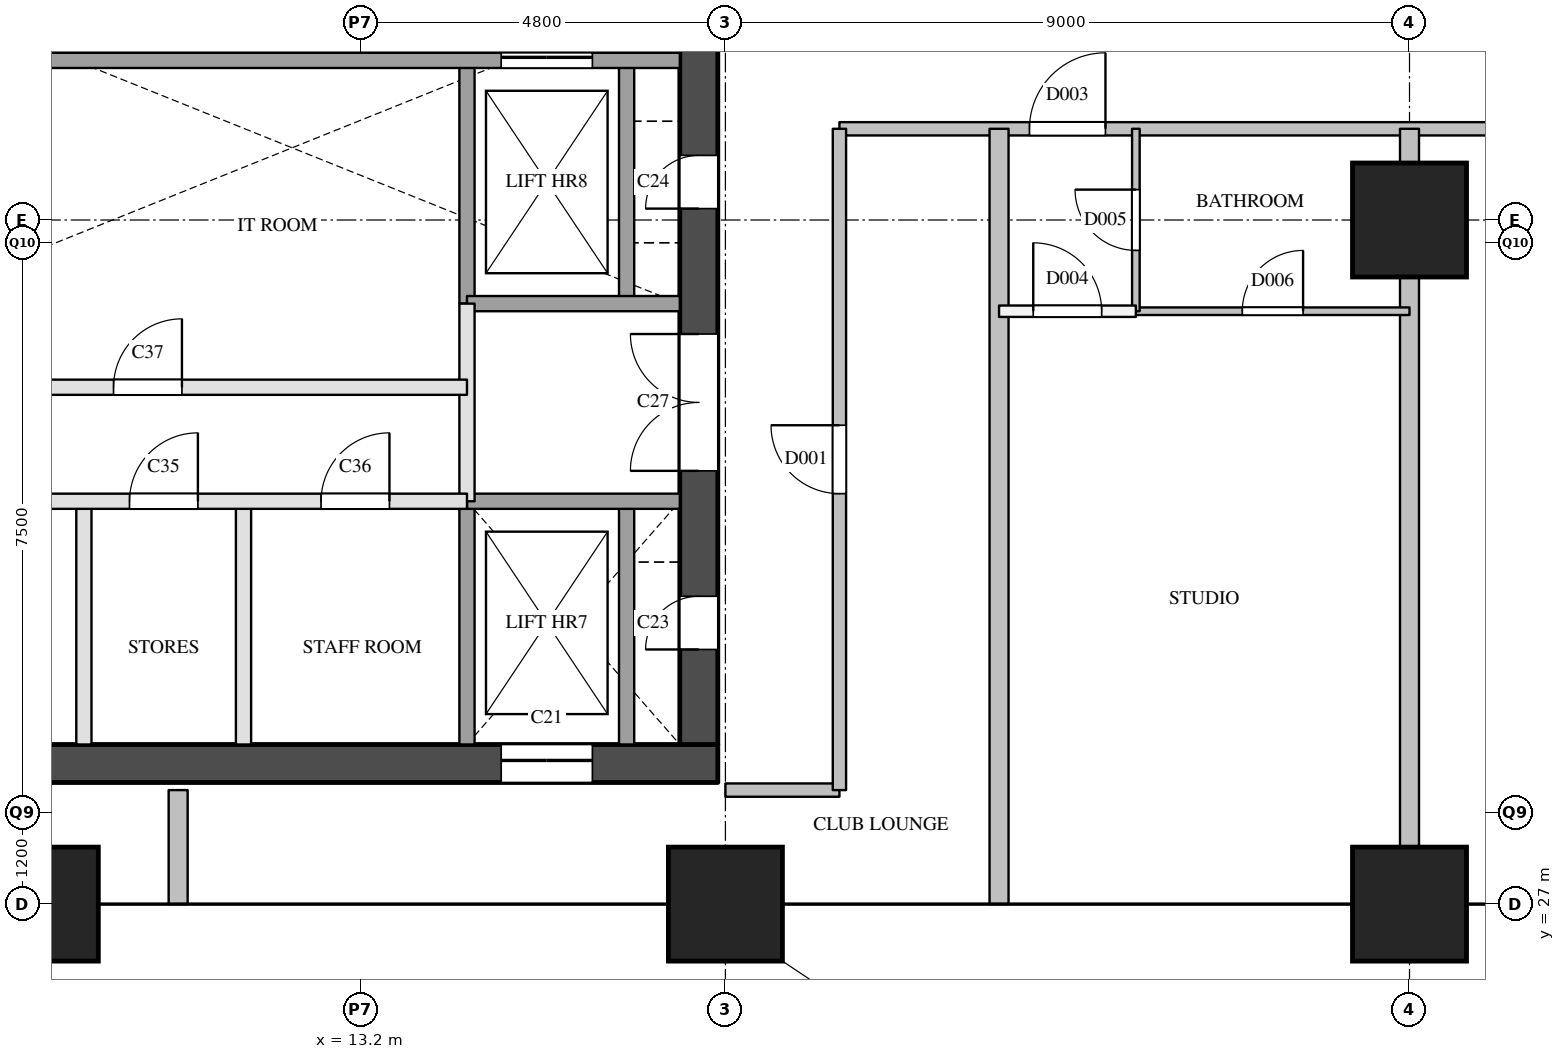
"""IFC4 building model, lengths in metres.
Left out: names, types, materials, properties, quantities, classifications, styles, units other than length and angle.
Written with IfcOpenShell. Run it as: python <this file> out.ifc"""

import sys

from ifc_helpers import new_model, si_unit, direction, frame, frame_2d, origin, origin_2d, place, context, subcontext, project, spatial, rectangle, extrude, element, fill, save


model = new_model("IFC4")
c1 = context("Model", 3, precision=1e-05, world=origin(), true_north=direction((0.0, 1.0)))
c2 = subcontext(c1, "Body", "Model", "MODEL_VIEW")
j1 = project(units=[si_unit("LENGTHUNIT", "METRE"), si_unit("PLANEANGLEUNIT", "RADIAN")], contexts=[c1])
p1 = place(None, origin())
s1 = spatial("IfcSite", under=j1, at=p1, CompositionType="ELEMENT")
p2 = place(p1, origin())
s2 = spatial("IfcBuilding", under=s1, at=p2, CompositionType="ELEMENT")
p3 = place(p2, frame((0.0, 0.0, 162.2)))
s3 = spatial("IfcBuildingStorey", under=s2, at=p3, CompositionType="ELEMENT", Elevation=162.2)
for number, where, z_axis, x_axis in (
    (1, (9.0, 27.0, 0.0), (0.0, 0.0, 1.0), (1.0, 0.0, 0.0)),
    (2, (18.0, 27.0, 0.0), (0.0, 0.0, 1.0), (1.0, 0.0, 0.0)),
    (3, (27.0, 27.0, 0.0), (0.0, 0.0, 1.0), (1.0, 0.0, 0.0)),
    (4, (27.0, 36.0, 0.0), (0.0, 0.0, 1.0), (1.0, 0.0, 0.0)),
):
    element("IfcColumn", number, at=place(p3, frame(where, z_axis=z_axis, x_axis=x_axis)), inside=s3, PredefinedType="COLUMN", context=c2, shape_type="SweptSolid", body=[
        extrude(rectangle(XDim=1.5, YDim=1.5, at=origin_2d()), origin(), (0.0, 0.0, 1.0), 3.9),
    ])
p4 = place(p3, frame((5.7, 28.85, 0.0), z_axis=(0.0, 0.0, 1.0), x_axis=(1.0, 0.0, 0.0)))
e5 = element("IfcWall", 5, at=p4, inside=s3, PredefinedType="SHEAR", context=c2, shape_type="SweptSolid", body=[
    extrude(rectangle(XDim=12.2, YDim=0.5, at=frame_2d((6.1, 0.0))), origin(), (0.0, 0.0, 1.0), 3.6),
])
p5 = place(p4, frame((9.35, 0.0, 0.0)))
e6 = element("IfcOpeningElement", 6, at=p5, cuts=e5, PredefinedType="OPENING", context=c2, shape_type="SweptSolid", body=[
    extrude(rectangle(XDim=1.2, YDim=2.1, at=frame_2d((0.6, 1.05))), frame((0.0, 0.26, 0.0), z_axis=(0.0, -1.0, 0.0), x_axis=(1.0, 0.0, 0.0)), (0.0, 0.0, 1.0), 0.52),
])
p6 = place(p3, frame((17.65, 29.1, 0.0), z_axis=(0.0, 0.0, 1.0), x_axis=(0.0, 1.0, 0.0)))
e7 = element("IfcWall", 7, at=p6, inside=s3, PredefinedType="SHEAR", context=c2, shape_type="SweptSolid", body=[
    extrude(rectangle(XDim=20.3, YDim=0.5, at=frame_2d((10.15, 0.0))), origin(), (0.0, 0.0, 1.0), 3.6),
])
p7 = place(p6, frame((1.25, 0.0, 0.0)))
e8 = element("IfcOpeningElement", 8, at=p7, cuts=e7, PredefinedType="OPENING", context=c2, shape_type="SweptSolid", body=[
    extrude(rectangle(XDim=0.7, YDim=2.1, at=frame_2d((0.35, 1.05))), frame((0.0, 0.26, 0.0), z_axis=(0.0, -1.0, 0.0), x_axis=(1.0, 0.0, 0.0)), (0.0, 0.0, 1.0), 0.52),
])
p8 = place(p6, frame((7.05, 0.0, 0.0)))
e9 = element("IfcOpeningElement", 9, at=p8, cuts=e7, PredefinedType="OPENING", context=c2, shape_type="SweptSolid", body=[
    extrude(rectangle(XDim=0.7, YDim=2.1, at=frame_2d((0.35, 1.05))), frame((0.0, 0.26, 0.0), z_axis=(0.0, -1.0, 0.0), x_axis=(1.0, 0.0, 0.0)), (0.0, 0.0, 1.0), 0.52),
])
p9 = place(p6, frame((3.6, 0.0, 0.0)))
e10 = element("IfcOpeningElement", 10, at=p9, cuts=e7, PredefinedType="OPENING", context=c2, shape_type="SweptSolid", body=[
    extrude(rectangle(XDim=1.8, YDim=2.1, at=frame_2d((0.9, 1.05))), frame((0.0, 0.26, 0.0), z_axis=(0.0, -1.0, 0.0), x_axis=(1.0, 0.0, 0.0)), (0.0, 0.0, 1.0), 0.52),
])
for number, where, z_axis, x_axis in (
    (11, (9.56, 29.1, 0.0), (0.0, 0.0, 1.0), (0.0, 1.0, 0.0)),
    (12, (11.66, 29.1, 0.0), (0.0, 0.0, 1.0), (0.0, 1.0, 0.0)),
):
    element("IfcWall", number, at=place(p3, frame(where, z_axis=z_axis, x_axis=x_axis)), inside=s3, PredefinedType="PARTITIONING", context=c2, shape_type="SweptSolid", body=[
        extrude(rectangle(XDim=3.2, YDim=0.2, at=frame_2d((1.6, 0.0))), origin(), (0.0, 0.0, 1.0), 3.6),
    ])
p10 = place(p3, frame((14.6, 32.3, 0.0), z_axis=(0.0, 0.0, 1.0), x_axis=(0.0, 1.0, 0.0)))
e13 = element("IfcWall", 13, at=p10, inside=s3, PredefinedType="PARTITIONING", context=c2, shape_type="SweptSolid", body=[
    extrude(rectangle(XDim=2.6, YDim=0.2, at=frame_2d((1.3, 0.0))), origin(), (0.0, 0.0, 1.0), 3.6),
])
p11 = place(p3, frame((14.6, 29.1, 0.0), z_axis=(0.0, 0.0, 1.0), x_axis=(0.0, 1.0, 0.0)))
e14 = element("IfcWall", 14, at=p11, inside=s3, PredefinedType="SOLIDWALL", context=c2, shape_type="SweptSolid", body=[
    extrude(rectangle(XDim=3.2, YDim=0.2, at=frame_2d((1.6, 0.0))), origin(), (0.0, 0.0, 1.0), 3.6),
])
p12 = place(p3, frame((14.6, 34.9, 0.0), z_axis=(0.0, 0.0, 1.0), x_axis=(0.0, 1.0, 0.0)))
e15 = element("IfcWall", 15, at=p12, inside=s3, PredefinedType="SOLIDWALL", context=c2, shape_type="SweptSolid", body=[
    extrude(rectangle(XDim=3.2, YDim=0.2, at=frame_2d((1.6, 0.0))), origin(), (0.0, 0.0, 1.0), 3.6),
])
p13 = place(p3, frame((16.7, 29.1, 0.0), z_axis=(0.0, 0.0, 1.0), x_axis=(0.0, 1.0, 0.0)))
e16 = element("IfcWall", 16, at=p13, inside=s3, PredefinedType="SOLIDWALL", context=c2, shape_type="SweptSolid", body=[
    extrude(rectangle(XDim=3.2, YDim=0.2, at=frame_2d((1.6, 0.0))), origin(), (0.0, 0.0, 1.0), 3.6),
])
p14 = place(p3, frame((16.7, 34.9, 0.0), z_axis=(0.0, 0.0, 1.0), x_axis=(0.0, 1.0, 0.0)))
e17 = element("IfcWall", 17, at=p14, inside=s3, PredefinedType="SOLIDWALL", context=c2, shape_type="SweptSolid", body=[
    extrude(rectangle(XDim=3.2, YDim=0.2, at=frame_2d((1.6, 0.0))), origin(), (0.0, 0.0, 1.0), 3.6),
])
p15 = place(p3, frame((6.2, 32.3, 0.0), z_axis=(0.0, 0.0, 1.0), x_axis=(1.0, 0.0, 0.0)))
e18 = element("IfcWall", 18, at=p15, inside=s3, PredefinedType="PARTITIONING", context=c2, shape_type="SweptSolid", body=[
    extrude(rectangle(XDim=8.4, YDim=0.2, at=frame_2d((4.2, 0.0))), origin(), (0.0, 0.0, 1.0), 3.6),
])
p16 = place(p15, frame((1.23, 0.0, 0.0)))
e19 = element("IfcOpeningElement", 19, at=p16, cuts=e18, PredefinedType="OPENING", context=c2, shape_type="SweptSolid", body=[
    extrude(rectangle(XDim=0.9, YDim=2.1, at=frame_2d((0.45, 1.05))), frame((0.0, 0.11, 0.0), z_axis=(0.0, -1.0, 0.0), x_axis=(1.0, 0.0, 0.0)), (0.0, 0.0, 1.0), 0.22),
])
p17 = place(p15, frame((3.96, 0.0, 0.0)))
e20 = element("IfcOpeningElement", 20, at=p17, cuts=e18, PredefinedType="OPENING", context=c2, shape_type="SweptSolid", body=[
    extrude(rectangle(XDim=0.9, YDim=2.1, at=frame_2d((0.45, 1.05))), frame((0.0, 0.11, 0.0), z_axis=(0.0, -1.0, 0.0), x_axis=(1.0, 0.0, 0.0)), (0.0, 0.0, 1.0), 0.22),
])
p18 = place(p15, frame((6.48, 0.0, 0.0)))
e21 = element("IfcOpeningElement", 21, at=p18, cuts=e18, PredefinedType="OPENING", context=c2, shape_type="SweptSolid", body=[
    extrude(rectangle(XDim=0.9, YDim=2.1, at=frame_2d((0.45, 1.05))), frame((0.0, 0.11, 0.0), z_axis=(0.0, -1.0, 0.0), x_axis=(1.0, 0.0, 0.0)), (0.0, 0.0, 1.0), 0.22),
])
p19 = place(p3, frame((14.6, 32.3, 0.0), z_axis=(0.0, 0.0, 1.0), x_axis=(1.0, 0.0, 0.0)))
e22 = element("IfcWall", 22, at=p19, inside=s3, PredefinedType="SOLIDWALL", context=c2, shape_type="SweptSolid", body=[
    extrude(rectangle(XDim=2.8, YDim=0.2, at=frame_2d((1.4, 0.0))), origin(), (0.0, 0.0, 1.0), 3.6),
])
p20 = place(p3, frame((6.2, 33.8, 0.0), z_axis=(0.0, 0.0, 1.0), x_axis=(1.0, 0.0, 0.0)))
e23 = element("IfcWall", 23, at=p20, inside=s3, PredefinedType="PARTITIONING", context=c2, shape_type="SweptSolid", body=[
    extrude(rectangle(XDim=8.4, YDim=0.2, at=frame_2d((4.2, 0.0))), origin(), (0.0, 0.0, 1.0), 3.6),
])
p21 = place(p20, frame((3.75, 0.0, 0.0)))
e24 = element("IfcOpeningElement", 24, at=p21, cuts=e23, PredefinedType="OPENING", context=c2, shape_type="SweptSolid", body=[
    extrude(rectangle(XDim=0.9, YDim=2.1, at=frame_2d((0.45, 1.05))), frame((0.0, 0.11, 0.0), z_axis=(0.0, -1.0, 0.0), x_axis=(1.0, 0.0, 0.0)), (0.0, 0.0, 1.0), 0.22),
])
p22 = place(p3, frame((14.6, 34.9, 0.0), z_axis=(0.0, 0.0, 1.0), x_axis=(1.0, 0.0, 0.0)))
e25 = element("IfcWall", 25, at=p22, inside=s3, PredefinedType="SOLIDWALL", context=c2, shape_type="SweptSolid", body=[
    extrude(rectangle(XDim=2.8, YDim=0.2, at=frame_2d((1.4, 0.0))), origin(), (0.0, 0.0, 1.0), 3.6),
])
p23 = place(p3, frame((6.2, 38.1, 0.0), z_axis=(0.0, 0.0, 1.0), x_axis=(1.0, 0.0, 0.0)))
e26 = element("IfcWall", 26, at=p23, inside=s3, PredefinedType="SOLIDWALL", context=c2, shape_type="SweptSolid", body=[
    extrude(rectangle(XDim=11.2, YDim=0.2, at=frame_2d((5.6, 0.0))), origin(), (0.0, 0.0, 1.0), 3.6),
])
p24 = place(p23, frame((8.85, 0.0, 0.0)))
e27 = element("IfcOpeningElement", 27, at=p24, cuts=e26, PredefinedType="OPENING", context=c2, shape_type="SweptSolid", body=[
    extrude(rectangle(XDim=1.2, YDim=2.1, at=frame_2d((0.6, 1.05))), frame((0.0, 0.11, 0.0), z_axis=(0.0, -1.0, 0.0), x_axis=(1.0, 0.0, 0.0)), (0.0, 0.0, 1.0), 0.22),
])
p25 = place(p3, frame((18.0, 28.5, 0.0), z_axis=(0.0, 0.0, 1.0), x_axis=(1.0, 0.0, 0.0)))
e28 = element("IfcWall", 28, at=p25, inside=s3, PredefinedType="PARTITIONING", context=c2, shape_type="SweptSolid", body=[
    extrude(rectangle(XDim=1.5, YDim=0.175, at=frame_2d((0.75, 0.0))), origin(), (0.0, 0.0, 1.0), 3.6),
])
p26 = place(p3, frame((19.5, 37.2, 0.0), z_axis=(0.0, 0.0, 1.0), x_axis=(1.0, 0.0, 0.0)))
e29 = element("IfcWall", 29, at=p26, inside=s3, PredefinedType="PARTITIONING", context=c2, shape_type="SweptSolid", body=[
    extrude(rectangle(XDim=15.0, YDim=0.175, at=frame_2d((7.5, 0.0))), origin(), (0.0, 0.0, 1.0), 2.6),
])
p27 = place(p26, frame((2.5, 0.0, 0.0)))
e30 = element("IfcOpeningElement", 30, at=p27, cuts=e29, PredefinedType="OPENING", context=c2, shape_type="SweptSolid", body=[
    extrude(rectangle(XDim=1.0, YDim=2.1, at=frame_2d((0.5, 1.05))), frame((0.0, 0.097, 0.0), z_axis=(0.0, -1.0, 0.0), x_axis=(1.0, 0.0, 0.0)), (0.0, 0.0, 1.0), 0.195),
])
p28 = place(p3, frame((19.5, 28.5, 0.0), z_axis=(0.0, 0.0, 1.0), x_axis=(0.0, 1.0, 0.0)))
e31 = element("IfcWall", 31, at=p28, inside=s3, PredefinedType="PARTITIONING", context=c2, shape_type="SweptSolid", body=[
    extrude(rectangle(XDim=8.7, YDim=0.175, at=frame_2d((4.35, 0.0))), origin(), (0.0, 0.0, 1.0), 3.6),
])
p29 = place(p28, frame((3.9, 0.0, 0.0)))
e32 = element("IfcOpeningElement", 32, at=p29, cuts=e31, PredefinedType="OPENING", context=c2, shape_type="SweptSolid", body=[
    extrude(rectangle(XDim=0.9, YDim=2.1, at=frame_2d((0.45, 1.05))), frame((0.0, 0.097, 0.0), z_axis=(0.0, -1.0, 0.0), x_axis=(1.0, 0.0, 0.0)), (0.0, 0.0, 1.0), 0.195),
])
p30 = place(p3, frame((21.6, 34.8, 0.0), z_axis=(0.0, 0.0, 1.0), x_axis=(1.0, 0.0, 0.0)))
e33 = element("IfcWall", 33, at=p30, inside=s3, PredefinedType="PARTITIONING", context=c2, shape_type="SweptSolid", body=[
    extrude(rectangle(XDim=1.8, YDim=0.15, at=frame_2d((0.9, 0.0))), origin(), (0.0, 0.0, 1.0), 3.6),
])
p31 = place(p30, frame((0.45, 0.0, 0.0)))
e34 = element("IfcOpeningElement", 34, at=p31, cuts=e33, PredefinedType="OPENING", context=c2, shape_type="SweptSolid", body=[
    extrude(rectangle(XDim=0.9, YDim=2.1, at=frame_2d((0.45, 1.05))), frame((0.0, 0.085, 0.0), z_axis=(0.0, -1.0, 0.0), x_axis=(1.0, 0.0, 0.0)), (0.0, 0.0, 1.0), 0.17),
])
p32 = place(p3, frame((10.8, 27.0, 0.0), z_axis=(0.0, 0.0, 1.0), x_axis=(0.0, 1.0, 0.0)))
e35 = element("IfcWall", 35, at=p32, inside=s3, PredefinedType="PARTITIONING", context=c2, shape_type="SweptSolid", body=[
    extrude(rectangle(XDim=1.5, YDim=0.25, at=frame_2d((0.75, 0.0))), origin(), (0.0, 0.0, 1.0), 2.6),
])
for number, where, z_axis, x_axis in (
    (36, (21.6, 27.0, 0.0), (0.0, 0.0, 1.0), (0.0, 1.0, 0.0)),
    (37, (27.0, 27.0, 0.0), (0.0, 0.0, 1.0), (0.0, 1.0, 0.0)),
):
    element("IfcWall", number, at=place(p3, frame(where, z_axis=z_axis, x_axis=x_axis)), inside=s3, PredefinedType="PARTITIONING", context=c2, shape_type="SweptSolid", body=[
        extrude(rectangle(XDim=10.2, YDim=0.25, at=frame_2d((5.1, 0.0))), origin(), (0.0, 0.0, 1.0), 2.6),
    ])
p33 = place(p3, frame((23.4, 34.8, 0.0), z_axis=(0.0, 0.0, 1.0), x_axis=(1.0, 0.0, 0.0)))
e38 = element("IfcWall", 38, at=p33, inside=s3, PredefinedType="PARTITIONING", context=c2, shape_type="SweptSolid", body=[
    extrude(rectangle(XDim=3.6, YDim=0.1, at=frame_2d((1.8, 0.0))), origin(), (0.0, 0.0, 1.0), 2.6),
])
p34 = place(p33, frame((1.4, 0.0, 0.0)))
e39 = element("IfcOpeningElement", 39, at=p34, cuts=e38, PredefinedType="OPENING", context=c2, shape_type="SweptSolid", body=[
    extrude(rectangle(XDim=0.8, YDim=2.1, at=frame_2d((0.4, 1.05))), frame((0.0, 0.06, 0.0), z_axis=(0.0, -1.0, 0.0), x_axis=(1.0, 0.0, 0.0)), (0.0, 0.0, 1.0), 0.12),
])
p35 = place(p3, frame((23.4, 34.8, 0.0), z_axis=(0.0, 0.0, 1.0), x_axis=(0.0, 1.0, 0.0)))
e40 = element("IfcWall", 40, at=p35, inside=s3, PredefinedType="PARTITIONING", context=c2, shape_type="SweptSolid", body=[
    extrude(rectangle(XDim=2.4, YDim=0.1, at=frame_2d((1.2, 0.0))), origin(), (0.0, 0.0, 1.0), 3.6),
])
p36 = place(p35, frame((0.8, 0.0, 0.0)))
e41 = element("IfcOpeningElement", 41, at=p36, cuts=e40, PredefinedType="OPENING", context=c2, shape_type="SweptSolid", body=[
    extrude(rectangle(XDim=0.8, YDim=2.1, at=frame_2d((0.4, 1.05))), frame((0.0, 0.06, 0.0), z_axis=(0.0, -1.0, 0.0), x_axis=(1.0, 0.0, 0.0)), (0.0, 0.0, 1.0), 0.12),
])
p37 = place(p5, origin())
e42 = element("IfcDoor", 42, at=p37, inside=s3, OperationType="SLIDING_TO_LEFT", PredefinedType="DOOR", context=c2, shape_type="SweptSolid", body=[
    extrude(rectangle(XDim=1.2, YDim=2.1, at=frame_2d((0.6, 1.05))), frame((0.0, 0.025, 0.0), z_axis=(0.0, -1.0, 0.0), x_axis=(1.0, 0.0, 0.0)), (0.0, 0.0, 1.0), 0.05),
])
fill(e6, e42)
p38 = place(p24, origin())
e43 = element("IfcDoor", 43, at=p38, inside=s3, OperationType="SLIDING_TO_LEFT", PredefinedType="DOOR", context=c2, shape_type="SweptSolid", body=[
    extrude(rectangle(XDim=1.2, YDim=2.1, at=frame_2d((0.6, 1.05))), frame((0.0, 0.025, 0.0), z_axis=(0.0, -1.0, 0.0), x_axis=(1.0, 0.0, 0.0)), (0.0, 0.0, 1.0), 0.05),
])
fill(e27, e43)
p39 = place(p7, origin())
e44 = element("IfcDoor", 44, at=p39, inside=s3, OperationType="SINGLE_SWING_LEFT", PredefinedType="DOOR", context=c2, shape_type="SweptSolid", body=[
    extrude(rectangle(XDim=0.7, YDim=2.1, at=frame_2d((0.35, 1.05))), frame((0.0, 0.025, 0.0), z_axis=(0.0, -1.0, 0.0), x_axis=(1.0, 0.0, 0.0)), (0.0, 0.0, 1.0), 0.05),
])
fill(e8, e44)
p40 = place(p8, origin())
e45 = element("IfcDoor", 45, at=p40, inside=s3, OperationType="SINGLE_SWING_LEFT", PredefinedType="DOOR", context=c2, shape_type="SweptSolid", body=[
    extrude(rectangle(XDim=0.7, YDim=2.1, at=frame_2d((0.35, 1.05))), frame((0.0, 0.025, 0.0), z_axis=(0.0, -1.0, 0.0), x_axis=(1.0, 0.0, 0.0)), (0.0, 0.0, 1.0), 0.05),
])
fill(e9, e45)
p41 = place(p9, origin())
e46 = element("IfcDoor", 46, at=p41, inside=s3, OperationType="DOUBLE_DOOR_SINGLE_SWING", PredefinedType="DOOR", context=c2, shape_type="SweptSolid", body=[
    extrude(rectangle(XDim=1.8, YDim=2.1, at=frame_2d((0.9, 1.05))), frame((0.0, 0.025, 0.0), z_axis=(0.0, -1.0, 0.0), x_axis=(1.0, 0.0, 0.0)), (0.0, 0.0, 1.0), 0.05),
])
fill(e10, e46)
p42 = place(p17, origin())
e47 = element("IfcDoor", 47, at=p42, inside=s3, OperationType="SINGLE_SWING_RIGHT", PredefinedType="DOOR", context=c2, shape_type="SweptSolid", body=[
    extrude(rectangle(XDim=0.9, YDim=2.1, at=frame_2d((0.45, 1.05))), frame((0.0, 0.025, 0.0), z_axis=(0.0, -1.0, 0.0), x_axis=(1.0, 0.0, 0.0)), (0.0, 0.0, 1.0), 0.05),
])
fill(e20, e47)
p43 = place(p18, origin())
e48 = element("IfcDoor", 48, at=p43, inside=s3, OperationType="SINGLE_SWING_RIGHT", PredefinedType="DOOR", context=c2, shape_type="SweptSolid", body=[
    extrude(rectangle(XDim=0.9, YDim=2.1, at=frame_2d((0.45, 1.05))), frame((0.0, 0.025, 0.0), z_axis=(0.0, -1.0, 0.0), x_axis=(1.0, 0.0, 0.0)), (0.0, 0.0, 1.0), 0.05),
])
fill(e21, e48)
p44 = place(p21, origin())
e49 = element("IfcDoor", 49, at=p44, inside=s3, OperationType="SINGLE_SWING_RIGHT", PredefinedType="DOOR", context=c2, shape_type="SweptSolid", body=[
    extrude(rectangle(XDim=0.9, YDim=2.1, at=frame_2d((0.45, 1.05))), frame((0.0, 0.025, 0.0), z_axis=(0.0, -1.0, 0.0), x_axis=(1.0, 0.0, 0.0)), (0.0, 0.0, 1.0), 0.05),
])
fill(e24, e49)
p45 = place(p29, origin())
e50 = element("IfcDoor", 50, at=p45, inside=s3, OperationType="SINGLE_SWING_RIGHT", PredefinedType="DOOR", context=c2, shape_type="SweptSolid", body=[
    extrude(rectangle(XDim=0.9, YDim=2.1, at=frame_2d((0.45, 1.05))), frame((0.0, 0.025, 0.0), z_axis=(0.0, -1.0, 0.0), x_axis=(1.0, 0.0, 0.0)), (0.0, 0.0, 1.0), 0.05),
])
fill(e32, e50)
p46 = place(p27, origin())
e51 = element("IfcDoor", 51, at=p46, inside=s3, OperationType="SINGLE_SWING_RIGHT", PredefinedType="DOOR", context=c2, shape_type="SweptSolid", body=[
    extrude(rectangle(XDim=1.0, YDim=2.1, at=frame_2d((0.5, 1.05))), frame((0.0, 0.025, 0.0), z_axis=(0.0, -1.0, 0.0), x_axis=(1.0, 0.0, 0.0)), (0.0, 0.0, 1.0), 0.05),
])
fill(e30, e51)
p47 = place(p31, origin())
e52 = element("IfcDoor", 52, at=p47, inside=s3, OperationType="SINGLE_SWING_LEFT", PredefinedType="DOOR", context=c2, shape_type="SweptSolid", body=[
    extrude(rectangle(XDim=0.9, YDim=2.1, at=frame_2d((0.45, 1.05))), frame((0.0, 0.025, 0.0), z_axis=(0.0, -1.0, 0.0), x_axis=(1.0, 0.0, 0.0)), (0.0, 0.0, 1.0), 0.05),
])
fill(e34, e52)
p48 = place(p36, origin())
e53 = element("IfcDoor", 53, at=p48, inside=s3, OperationType="SINGLE_SWING_RIGHT", PredefinedType="DOOR", context=c2, shape_type="SweptSolid", body=[
    extrude(rectangle(XDim=0.8, YDim=2.1, at=frame_2d((0.4, 1.05))), frame((0.0, 0.025, 0.0), z_axis=(0.0, -1.0, 0.0), x_axis=(1.0, 0.0, 0.0)), (0.0, 0.0, 1.0), 0.05),
])
fill(e41, e53)
p49 = place(p34, origin())
e54 = element("IfcDoor", 54, at=p49, inside=s3, OperationType="SINGLE_SWING_RIGHT", PredefinedType="DOOR", context=c2, shape_type="SweptSolid", body=[
    extrude(rectangle(XDim=0.8, YDim=2.1, at=frame_2d((0.4, 1.05))), frame((0.0, 0.025, 0.0), z_axis=(0.0, -1.0, 0.0), x_axis=(1.0, 0.0, 0.0)), (0.0, 0.0, 1.0), 0.05),
])
fill(e39, e54)
save(model, sys.argv[1])
